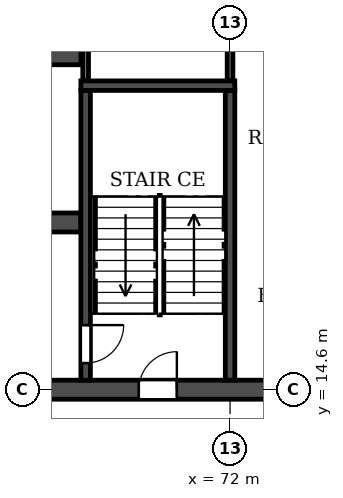
"""IFC4 building model, lengths in metres.
Left out: names, types, materials, properties, quantities, classifications, styles, units other than length and angle.
Written with IfcOpenShell. Run it as: python <this file> out.ifc"""

import sys

from ifc_helpers import new_model, si_unit, direction, frame, frame_2d, origin, place, context, subcontext, project, spatial, rectangle, extrude, element, fill, save


model = new_model("IFC4")
c1 = context("Model", 3, precision=1e-05, world=origin(), true_north=direction((0.0, 1.0)))
c2 = subcontext(c1, "Body", "Model", "MODEL_VIEW")
j1 = project(units=[si_unit("LENGTHUNIT", "METRE"), si_unit("PLANEANGLEUNIT", "RADIAN")], contexts=[c1])
p1 = place(None, origin())
s1 = spatial("IfcSite", under=j1, at=p1, CompositionType="ELEMENT")
p2 = place(p1, origin())
s2 = spatial("IfcBuilding", under=s1, at=p2, CompositionType="ELEMENT")
p3 = place(p2, frame((0.0, 0.0, 76.2)))
s3 = spatial("IfcBuildingStorey", under=s2, at=p3, CompositionType="ELEMENT", Elevation=76.2)
p4 = place(p3, frame((8.6, 14.6, 0.0), z_axis=(0.0, 0.0, 1.0), x_axis=(1.0, 0.0, 0.0)))
e1 = element("IfcWall", 1, at=p4, inside=s3, PredefinedType="SOLIDWALL", context=c2, shape_type="SweptSolid", body=[
    extrude(rectangle(XDim=84.8, YDim=0.5, at=frame_2d((42.4, 0.0))), origin(), (0.0, 0.0, 1.0), 3.06),
])
p5 = place(p4, frame((2.25, 0.0, 0.0)))
e2 = element("IfcOpeningElement", 2, at=p5, cuts=e1, PredefinedType="OPENING", context=c2, shape_type="SweptSolid", body=[
    extrude(rectangle(XDim=1.0, YDim=2.1, at=frame_2d((0.5, 1.05))), frame((0.0, 0.26, 0.0), z_axis=(0.0, -1.0, 0.0), x_axis=(1.0, 0.0, 0.0)), (0.0, 0.0, 1.0), 0.52),
])
p6 = place(p4, frame((6.95, 0.0, 0.0)))
e3 = element("IfcOpeningElement", 3, at=p6, cuts=e1, PredefinedType="OPENING", context=c2, shape_type="SweptSolid", body=[
    extrude(rectangle(XDim=1.0, YDim=2.1, at=frame_2d((0.5, 1.05))), frame((0.0, 0.26, 0.0), z_axis=(0.0, -1.0, 0.0), x_axis=(1.0, 0.0, 0.0)), (0.0, 0.0, 1.0), 0.52),
])
p7 = place(p4, frame((10.3, 0.0, 0.0)))
e4 = element("IfcOpeningElement", 4, at=p7, cuts=e1, PredefinedType="OPENING", context=c2, shape_type="SweptSolid", body=[
    extrude(rectangle(XDim=1.0, YDim=2.1, at=frame_2d((0.5, 1.05))), frame((0.0, 0.26, 0.0), z_axis=(0.0, -1.0, 0.0), x_axis=(1.0, 0.0, 0.0)), (0.0, 0.0, 1.0), 0.52),
])
p8 = place(p4, frame((18.2, 0.0, 0.0)))
e5 = element("IfcOpeningElement", 5, at=p8, cuts=e1, PredefinedType="OPENING", context=c2, shape_type="SweptSolid", body=[
    extrude(rectangle(XDim=1.0, YDim=2.1, at=frame_2d((0.5, 1.05))), frame((0.0, 0.26, 0.0), z_axis=(0.0, -1.0, 0.0), x_axis=(1.0, 0.0, 0.0)), (0.0, 0.0, 1.0), 0.52),
])
p9 = place(p4, frame((22.8, 0.0, 0.0)))
e6 = element("IfcOpeningElement", 6, at=p9, cuts=e1, PredefinedType="OPENING", context=c2, shape_type="SweptSolid", body=[
    extrude(rectangle(XDim=1.0, YDim=2.1, at=frame_2d((0.5, 1.05))), frame((0.0, 0.26, 0.0), z_axis=(0.0, -1.0, 0.0), x_axis=(1.0, 0.0, 0.0)), (0.0, 0.0, 1.0), 0.52),
])
p10 = place(p4, frame((35.4, 0.0, 0.0)))
e7 = element("IfcOpeningElement", 7, at=p10, cuts=e1, PredefinedType="OPENING", context=c2, shape_type="SweptSolid", body=[
    extrude(rectangle(XDim=1.0, YDim=2.1, at=frame_2d((0.5, 1.05))), frame((0.0, 0.26, 0.0), z_axis=(0.0, -1.0, 0.0), x_axis=(1.0, 0.0, 0.0)), (0.0, 0.0, 1.0), 0.52),
])
p11 = place(p4, frame((39.3, 0.0, 0.0)))
e8 = element("IfcOpeningElement", 8, at=p11, cuts=e1, PredefinedType="OPENING", context=c2, shape_type="SweptSolid", body=[
    extrude(rectangle(XDim=1.0, YDim=2.1, at=frame_2d((0.5, 1.05))), frame((0.0, 0.26, 0.0), z_axis=(0.0, -1.0, 0.0), x_axis=(1.0, 0.0, 0.0)), (0.0, 0.0, 1.0), 0.52),
])
p12 = place(p4, frame((41.9, 0.0, 0.0)))
e9 = element("IfcOpeningElement", 9, at=p12, cuts=e1, PredefinedType="OPENING", context=c2, shape_type="SweptSolid", body=[
    extrude(rectangle(XDim=1.0, YDim=2.1, at=frame_2d((0.5, 1.05))), frame((0.0, 0.26, 0.0), z_axis=(0.0, -1.0, 0.0), x_axis=(1.0, 0.0, 0.0)), (0.0, 0.0, 1.0), 0.52),
])
p13 = place(p4, frame((44.5, 0.0, 0.0)))
e10 = element("IfcOpeningElement", 10, at=p13, cuts=e1, PredefinedType="OPENING", context=c2, shape_type="SweptSolid", body=[
    extrude(rectangle(XDim=1.0, YDim=2.1, at=frame_2d((0.5, 1.05))), frame((0.0, 0.26, 0.0), z_axis=(0.0, -1.0, 0.0), x_axis=(1.0, 0.0, 0.0)), (0.0, 0.0, 1.0), 0.52),
])
p14 = place(p4, frame((48.4, 0.0, 0.0)))
e11 = element("IfcOpeningElement", 11, at=p14, cuts=e1, PredefinedType="OPENING", context=c2, shape_type="SweptSolid", body=[
    extrude(rectangle(XDim=1.0, YDim=2.1, at=frame_2d((0.5, 1.05))), frame((0.0, 0.26, 0.0), z_axis=(0.0, -1.0, 0.0), x_axis=(1.0, 0.0, 0.0)), (0.0, 0.0, 1.0), 0.52),
])
p15 = place(p4, frame((61.0, 0.0, 0.0)))
e12 = element("IfcOpeningElement", 12, at=p15, cuts=e1, PredefinedType="OPENING", context=c2, shape_type="SweptSolid", body=[
    extrude(rectangle(XDim=1.0, YDim=2.1, at=frame_2d((0.5, 1.05))), frame((0.0, 0.26, 0.0), z_axis=(0.0, -1.0, 0.0), x_axis=(1.0, 0.0, 0.0)), (0.0, 0.0, 1.0), 0.52),
])
p16 = place(p4, frame((65.6, 0.0, 0.0)))
e13 = element("IfcOpeningElement", 13, at=p16, cuts=e1, PredefinedType="OPENING", context=c2, shape_type="SweptSolid", body=[
    extrude(rectangle(XDim=1.0, YDim=2.1, at=frame_2d((0.5, 1.05))), frame((0.0, 0.26, 0.0), z_axis=(0.0, -1.0, 0.0), x_axis=(1.0, 0.0, 0.0)), (0.0, 0.0, 1.0), 0.52),
])
p17 = place(p4, frame((73.5, 0.0, 0.0)))
e14 = element("IfcOpeningElement", 14, at=p17, cuts=e1, PredefinedType="OPENING", context=c2, shape_type="SweptSolid", body=[
    extrude(rectangle(XDim=1.0, YDim=2.1, at=frame_2d((0.5, 1.05))), frame((0.0, 0.26, 0.0), z_axis=(0.0, -1.0, 0.0), x_axis=(1.0, 0.0, 0.0)), (0.0, 0.0, 1.0), 0.52),
])
p18 = place(p4, frame((76.55, 0.0, 0.0)))
e15 = element("IfcOpeningElement", 15, at=p18, cuts=e1, PredefinedType="OPENING", context=c2, shape_type="SweptSolid", body=[
    extrude(rectangle(XDim=1.0, YDim=2.1, at=frame_2d((0.5, 1.05))), frame((0.0, 0.26, 0.0), z_axis=(0.0, -1.0, 0.0), x_axis=(1.0, 0.0, 0.0)), (0.0, 0.0, 1.0), 0.52),
])
p19 = place(p4, frame((81.0, 0.0, 0.0)))
e16 = element("IfcOpeningElement", 16, at=p19, cuts=e1, PredefinedType="OPENING", context=c2, shape_type="SweptSolid", body=[
    extrude(rectangle(XDim=1.5, YDim=2.1, at=frame_2d((0.75, 1.05))), frame((0.0, 0.26, 0.0), z_axis=(0.0, -1.0, 0.0), x_axis=(1.0, 0.0, 0.0)), (0.0, 0.0, 1.0), 0.52),
])
p20 = place(p3, frame((33.925, 19.0, 0.0), z_axis=(0.0, 0.0, 1.0), x_axis=(1.0, 0.0, 0.0)))
e17 = element("IfcWall", 17, at=p20, inside=s3, PredefinedType="SOLIDWALL", context=c2, shape_type="SweptSolid", body=[
    extrude(rectangle(XDim=34.15, YDim=0.5, at=frame_2d((17.075, 0.0))), origin(), (0.0, 0.0, 1.0), 3.06),
])
p21 = place(p20, frame((16.175, 0.0, 0.0)))
e18 = element("IfcOpeningElement", 18, at=p21, cuts=e17, PredefinedType="OPENING", context=c2, shape_type="SweptSolid", body=[
    extrude(rectangle(XDim=1.8, YDim=2.1, at=frame_2d((0.9, 1.05))), frame((0.0, 0.26, 0.0), z_axis=(0.0, -1.0, 0.0), x_axis=(1.0, 0.0, 0.0)), (0.0, 0.0, 1.0), 0.52),
])
p22 = place(p20, frame((1.525, 0.0, 0.0)))
e19 = element("IfcOpeningElement", 19, at=p22, cuts=e17, PredefinedType="OPENING", context=c2, shape_type="SweptSolid", body=[
    extrude(rectangle(XDim=1.8, YDim=2.1, at=frame_2d((0.9, 1.05))), frame((0.0, 0.26, 0.0), z_axis=(0.0, -1.0, 0.0), x_axis=(1.0, 0.0, 0.0)), (0.0, 0.0, 1.0), 0.52),
])
p23 = place(p20, frame((8.725, 0.0, 0.0)))
e20 = element("IfcOpeningElement", 20, at=p23, cuts=e17, PredefinedType="OPENING", context=c2, shape_type="SweptSolid", body=[
    extrude(rectangle(XDim=1.1, YDim=2.1, at=frame_2d((0.55, 1.05))), frame((0.0, 0.26, 0.0), z_axis=(0.0, -1.0, 0.0), x_axis=(1.0, 0.0, 0.0)), (0.0, 0.0, 1.0), 0.52),
])
p24 = place(p20, frame((11.325, 0.0, 0.0)))
e21 = element("IfcOpeningElement", 21, at=p24, cuts=e17, PredefinedType="OPENING", context=c2, shape_type="SweptSolid", body=[
    extrude(rectangle(XDim=1.1, YDim=2.1, at=frame_2d((0.55, 1.05))), frame((0.0, 0.26, 0.0), z_axis=(0.0, -1.0, 0.0), x_axis=(1.0, 0.0, 0.0)), (0.0, 0.0, 1.0), 0.52),
])
p25 = place(p20, frame((13.925, 0.0, 0.0)))
e22 = element("IfcOpeningElement", 22, at=p25, cuts=e17, PredefinedType="OPENING", context=c2, shape_type="SweptSolid", body=[
    extrude(rectangle(XDim=1.1, YDim=2.1, at=frame_2d((0.55, 1.05))), frame((0.0, 0.26, 0.0), z_axis=(0.0, -1.0, 0.0), x_axis=(1.0, 0.0, 0.0)), (0.0, 0.0, 1.0), 0.52),
])
p26 = place(p20, frame((19.125, 0.0, 0.0)))
e23 = element("IfcOpeningElement", 23, at=p26, cuts=e17, PredefinedType="OPENING", context=c2, shape_type="SweptSolid", body=[
    extrude(rectangle(XDim=1.1, YDim=2.1, at=frame_2d((0.55, 1.05))), frame((0.0, 0.26, 0.0), z_axis=(0.0, -1.0, 0.0), x_axis=(1.0, 0.0, 0.0)), (0.0, 0.0, 1.0), 0.52),
])
p27 = place(p20, frame((21.725, 0.0, 0.0)))
e24 = element("IfcOpeningElement", 24, at=p27, cuts=e17, PredefinedType="OPENING", context=c2, shape_type="SweptSolid", body=[
    extrude(rectangle(XDim=1.1, YDim=2.1, at=frame_2d((0.55, 1.05))), frame((0.0, 0.26, 0.0), z_axis=(0.0, -1.0, 0.0), x_axis=(1.0, 0.0, 0.0)), (0.0, 0.0, 1.0), 0.52),
])
p28 = place(p20, frame((24.325, 0.0, 0.0)))
e25 = element("IfcOpeningElement", 25, at=p28, cuts=e17, PredefinedType="OPENING", context=c2, shape_type="SweptSolid", body=[
    extrude(rectangle(XDim=1.1, YDim=2.1, at=frame_2d((0.55, 1.05))), frame((0.0, 0.26, 0.0), z_axis=(0.0, -1.0, 0.0), x_axis=(1.0, 0.0, 0.0)), (0.0, 0.0, 1.0), 0.52),
])
p29 = place(p20, frame((30.825, 0.0, 0.0)))
e26 = element("IfcOpeningElement", 26, at=p29, cuts=e17, PredefinedType="OPENING", context=c2, shape_type="SweptSolid", body=[
    extrude(rectangle(XDim=1.8, YDim=2.1, at=frame_2d((0.9, 1.05))), frame((0.0, 0.26, 0.0), z_axis=(0.0, -1.0, 0.0), x_axis=(1.0, 0.0, 0.0)), (0.0, 0.0, 1.0), 0.52),
])
p30 = place(p3, frame((33.925, 23.4, 0.0), z_axis=(0.0, 0.0, 1.0), x_axis=(1.0, 0.0, 0.0)))
e27 = element("IfcWall", 27, at=p30, inside=s3, PredefinedType="SOLIDWALL", context=c2, shape_type="SweptSolid", body=[
    extrude(rectangle(XDim=34.15, YDim=0.5, at=frame_2d((17.075, 0.0))), origin(), (0.0, 0.0, 1.0), 3.06),
])
p31 = place(p30, frame((16.175, 0.0, 0.0)))
e28 = element("IfcOpeningElement", 28, at=p31, cuts=e27, PredefinedType="OPENING", context=c2, shape_type="SweptSolid", body=[
    extrude(rectangle(XDim=1.8, YDim=2.1, at=frame_2d((0.9, 1.05))), frame((0.0, 0.26, 0.0), z_axis=(0.0, -1.0, 0.0), x_axis=(1.0, 0.0, 0.0)), (0.0, 0.0, 1.0), 0.52),
])
p32 = place(p30, frame((11.025, 0.0, 0.0)))
e29 = element("IfcOpeningElement", 29, at=p32, cuts=e27, PredefinedType="OPENING", context=c2, shape_type="SweptSolid", body=[
    extrude(rectangle(XDim=1.1, YDim=2.1, at=frame_2d((0.55, 1.05))), frame((0.0, 0.26, 0.0), z_axis=(0.0, -1.0, 0.0), x_axis=(1.0, 0.0, 0.0)), (0.0, 0.0, 1.0), 0.52),
])
p33 = place(p3, frame((68.2, 14.85, 0.0), z_axis=(0.0, 0.0, 1.0), x_axis=(0.0, 1.0, 0.0)))
e30 = element("IfcWall", 30, at=p33, inside=s3, PredefinedType="SOLIDWALL", context=c2, shape_type="SweptSolid", body=[
    extrude(rectangle(XDim=7.625, YDim=0.25, at=frame_2d((3.812, 0.0))), origin(), (0.0, 0.0, 1.0), 3.06),
])
p34 = place(p33, frame((0.45, 0.0, 0.0)))
e31 = element("IfcOpeningElement", 31, at=p34, cuts=e30, PredefinedType="OPENING", context=c2, shape_type="SweptSolid", body=[
    extrude(rectangle(XDim=1.0, YDim=2.1, at=frame_2d((0.5, 1.05))), frame((0.0, 0.135, 0.0), z_axis=(0.0, -1.0, 0.0), x_axis=(1.0, 0.0, 0.0)), (0.0, 0.0, 1.0), 0.27),
])
p35 = place(p3, frame((72.0, 14.85, 0.0), z_axis=(0.0, 0.0, 1.0), x_axis=(0.0, 1.0, 0.0)))
e32 = element("IfcWall", 32, at=p35, inside=s3, PredefinedType="SOLIDWALL", context=c2, shape_type="SweptSolid", body=[
    extrude(rectangle(XDim=7.625, YDim=0.25, at=frame_2d((3.812, 0.0))), origin(), (0.0, 0.0, 1.0), 3.06),
])
p36 = place(p3, frame((68.075, 22.6, 0.0), z_axis=(0.0, 0.0, 1.0), x_axis=(1.0, 0.0, 0.0)))
e33 = element("IfcWall", 33, at=p36, inside=s3, PredefinedType="SOLIDWALL", context=c2, shape_type="SweptSolid", body=[
    extrude(rectangle(XDim=4.05, YDim=0.25, at=frame_2d((2.025, 0.0))), origin(), (0.0, 0.0, 1.0), 3.06),
])
for number, where, z_axis, x_axis in (
    (34, (68.2, 22.735, 0.0), (0.0, 0.0, 1.0), (0.0, 1.0, 0.0)),
    (35, (72.0, 22.735, 0.0), (0.0, 0.0, 1.0), (0.0, 1.0, 0.0)),
):
    element("IfcWall", number, at=place(p3, frame(where, z_axis=z_axis, x_axis=x_axis)), inside=s3, PredefinedType="PARTITIONING", context=c2, shape_type="SweptSolid", body=[
        extrude(rectangle(XDim=4.805, YDim=0.15, at=frame_2d((2.402, 0.0))), origin(), (0.0, 0.0, 1.0), 3.06),
    ])
p37 = place(p15, origin())
e36 = element("IfcDoor", 36, at=p37, inside=s3, OperationType="SINGLE_SWING_RIGHT", PredefinedType="DOOR", context=c2, shape_type="SweptSolid", body=[
    extrude(rectangle(XDim=1.0, YDim=2.1, at=frame_2d((0.5, 1.05))), frame((0.0, 0.025, 0.0), z_axis=(0.0, -1.0, 0.0), x_axis=(1.0, 0.0, 0.0)), (0.0, 0.0, 1.0), 0.05),
])
fill(e12, e36)
p38 = place(p34, frame((1.0, 0.0, 0.0), z_axis=(0.0, 0.0, 1.0), x_axis=(-1.0, 0.0, 0.0)))
e37 = element("IfcDoor", 37, at=p38, inside=s3, OperationType="SINGLE_SWING_LEFT", PredefinedType="DOOR", context=c2, shape_type="SweptSolid", body=[
    extrude(rectangle(XDim=1.0, YDim=2.1, at=frame_2d((0.5, 1.05))), frame((0.0, 0.025, 0.0), z_axis=(0.0, -1.0, 0.0), x_axis=(1.0, 0.0, 0.0)), (0.0, 0.0, 1.0), 0.05),
])
fill(e31, e37)
save(model, sys.argv[1])
